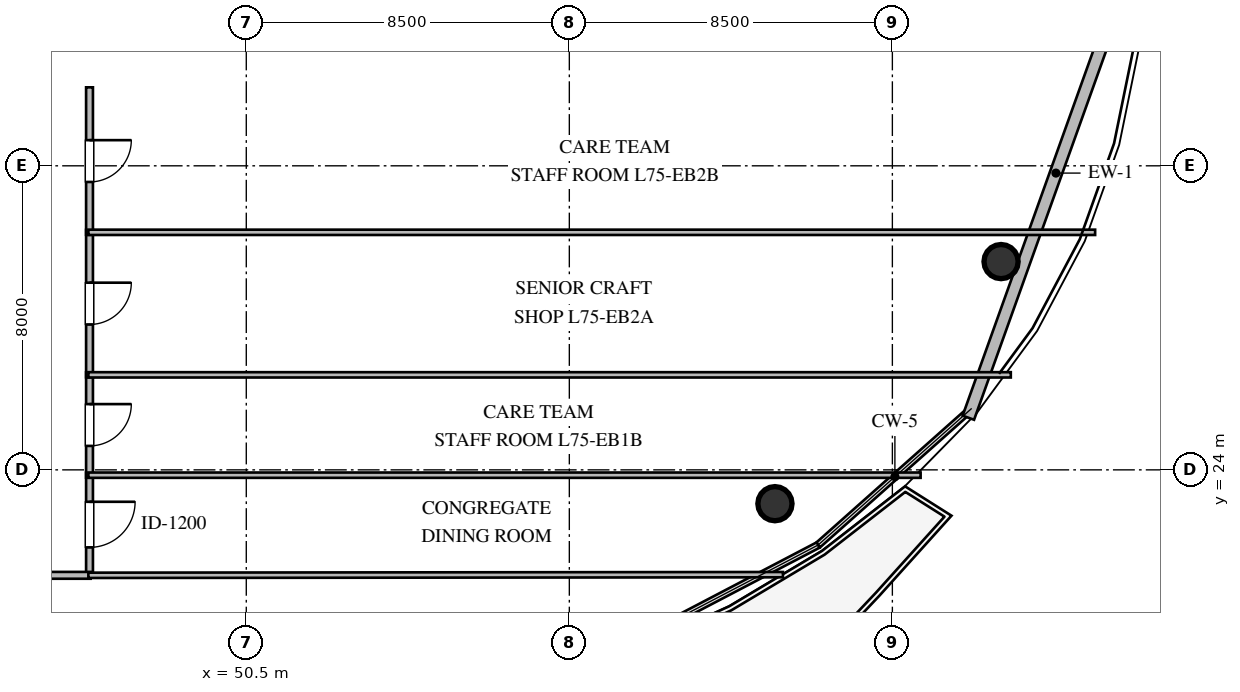
"""IFC4 building model, lengths in metres.
Left out: names, types, materials, properties, quantities, classifications, styles, units other than length and angle.
Written with IfcOpenShell. Run it as: python <this file> out.ifc"""

import sys

from ifc_helpers import new_model, si_unit, direction, frame, frame_2d, origin, origin_2d, place, context, subcontext, project, spatial, rectangle, circle, extrude, element, fill, save


model = new_model("IFC4")
c1 = context("Model", 3, precision=1e-05, world=origin(), true_north=direction((0.0, 1.0)))
c2 = subcontext(c1, "Body", "Model", "MODEL_VIEW")
j1 = project(units=[si_unit("LENGTHUNIT", "METRE"), si_unit("PLANEANGLEUNIT", "RADIAN")], contexts=[c1])
p1 = place(None, origin())
s1 = spatial("IfcSite", under=j1, at=p1, CompositionType="ELEMENT")
p2 = place(p1, origin())
s2 = spatial("IfcBuilding", under=s1, at=p2, CompositionType="ELEMENT")
p3 = place(p2, frame((0.0, 0.0, 285.2)))
s3 = spatial("IfcBuildingStorey", under=s2, at=p3, CompositionType="ELEMENT", Elevation=285.2)
for number, where, z_axis, x_axis in (
    (1, (64.41, 23.11, 0.0), (0.0, 0.0, 1.0), (1.0, 0.0, 0.0)),
    (2, (70.36, 29.48, 0.0), (0.0, 0.0, 1.0), (1.0, 0.0, 0.0)),
):
    element("IfcColumn", number, at=place(p3, frame(where, z_axis=z_axis, x_axis=x_axis)), inside=s3, PredefinedType="COLUMN", context=c2, shape_type="SweptSolid", body=[
        extrude(circle(Radius=0.45, at=origin_2d()), origin(), (0.0, 0.0, 1.0), 3.8),
    ])
p4 = place(p3, frame((74.108, 38.245, 0.0), z_axis=(0.0, 0.0, 1.0), x_axis=(-0.337073777429, -0.941478235845, 0.0)))
e3 = element("IfcWall", 3, at=p4, inside=s3, PredefinedType="STANDARD", context=c2, shape_type="SweptSolid", body=[
    extrude(rectangle(XDim=13.673, YDim=0.32, at=frame_2d((6.837, 0.0))), origin(), (0.0, 0.0, 1.0), 3.56),
])
p5 = place(p3, frame((46.375, 23.925, 0.0), z_axis=(0.0, 0.0, 1.0), x_axis=(0.0, -1.0, 0.0)))
e4 = element("IfcWall", 4, at=p5, inside=s3, PredefinedType="PARTITIONING", context=c2, shape_type="SweptSolid", body=[
    extrude(rectangle(XDim=2.73, YDim=0.18, at=frame_2d((1.365, 0.0))), origin(), (0.0, 0.0, 1.0), 3.56),
])
p6 = place(p5, frame((0.765, 0.0, 0.0)))
e5 = element("IfcOpeningElement", 5, at=p6, cuts=e4, PredefinedType="OPENING", context=c2, shape_type="SweptSolid", body=[
    extrude(rectangle(XDim=1.2, YDim=2.15, at=frame_2d((0.6, 1.075))), frame((0.0, 0.1, 0.0), z_axis=(0.0, -1.0, 0.0), x_axis=(1.0, 0.0, 0.0)), (0.0, 0.0, 1.0), 0.2),
])
p7 = place(p3, frame((46.375, 26.565, 0.0), z_axis=(0.0, 0.0, 1.0), x_axis=(0.0, -1.0, 0.0)))
e6 = element("IfcWall", 6, at=p7, inside=s3, PredefinedType="PARTITIONING", context=c2, shape_type="SweptSolid", body=[
    extrude(rectangle(XDim=2.77, YDim=0.18, at=frame_2d((1.385, 0.0))), origin(), (0.0, 0.0, 1.0), 3.56),
])
p8 = place(p7, frame((0.835, 0.0, 0.0)))
e7 = element("IfcOpeningElement", 7, at=p8, cuts=e6, PredefinedType="OPENING", context=c2, shape_type="SweptSolid", body=[
    extrude(rectangle(XDim=1.1, YDim=2.1, at=frame_2d((0.55, 1.05))), frame((0.0, 0.1, 0.0), z_axis=(0.0, -1.0, 0.0), x_axis=(1.0, 0.0, 0.0)), (0.0, 0.0, 1.0), 0.2),
])
p9 = place(p3, frame((46.375, 30.315, 0.0), z_axis=(0.0, 0.0, 1.0), x_axis=(0.0, -1.0, 0.0)))
e8 = element("IfcWall", 8, at=p9, inside=s3, PredefinedType="PARTITIONING", context=c2, shape_type="SweptSolid", body=[
    extrude(rectangle(XDim=3.88, YDim=0.18, at=frame_2d((1.94, 0.0))), origin(), (0.0, 0.0, 1.0), 3.56),
])
p10 = place(p9, frame((1.39, 0.0, 0.0)))
e9 = element("IfcOpeningElement", 9, at=p10, cuts=e8, PredefinedType="OPENING", context=c2, shape_type="SweptSolid", body=[
    extrude(rectangle(XDim=1.1, YDim=2.1, at=frame_2d((0.55, 1.05))), frame((0.0, 0.1, 0.0), z_axis=(0.0, -1.0, 0.0), x_axis=(1.0, 0.0, 0.0)), (0.0, 0.0, 1.0), 0.2),
])
p11 = place(p3, frame((46.375, 34.065, 0.0), z_axis=(0.0, 0.0, 1.0), x_axis=(0.0, -1.0, 0.0)))
e10 = element("IfcWall", 10, at=p11, inside=s3, PredefinedType="PARTITIONING", context=c2, shape_type="SweptSolid", body=[
    extrude(rectangle(XDim=3.88, YDim=0.18, at=frame_2d((1.94, 0.0))), origin(), (0.0, 0.0, 1.0), 3.56),
])
p12 = place(p11, frame((1.39, 0.0, 0.0)))
e11 = element("IfcOpeningElement", 11, at=p12, cuts=e10, PredefinedType="OPENING", context=c2, shape_type="SweptSolid", body=[
    extrude(rectangle(XDim=1.1, YDim=2.1, at=frame_2d((0.55, 1.05))), frame((0.0, 0.1, 0.0), z_axis=(0.0, -1.0, 0.0), x_axis=(1.0, 0.0, 0.0)), (0.0, 0.0, 1.0), 0.2),
])
p13 = place(p3, frame((46.405, 21.225, 0.0), z_axis=(0.0, 0.0, 1.0), x_axis=(-1.0, 0.0, 0.0)))
e12 = element("IfcWall", 12, at=p13, inside=s3, PredefinedType="PARTITIONING", context=c2, shape_type="SweptSolid", body=[
    extrude(rectangle(XDim=13.47, YDim=0.18, at=frame_2d((6.735, 0.0))), origin(), (0.0, 0.0, 1.0), 3.196),
])
p14 = place(p13, frame((6.135, 0.0, 0.0)))
e13 = element("IfcOpeningElement", 13, at=p14, cuts=e12, PredefinedType="OPENING", context=c2, shape_type="SweptSolid", body=[
    extrude(rectangle(XDim=1.2, YDim=2.15, at=frame_2d((0.6, 1.075))), frame((0.0, 0.1, 0.0), z_axis=(0.0, -1.0, 0.0), x_axis=(1.0, 0.0, 0.0)), (0.0, 0.0, 1.0), 0.2),
])
p15 = place(p3, frame((46.345, 23.86, 0.0), z_axis=(0.0, 0.0, 1.0), x_axis=(1.0, 0.0, 0.0)))
e14 = element("IfcWall", 14, at=p15, inside=s3, PredefinedType="PARTITIONING", context=c2, shape_type="SweptSolid", body=[
    extrude(rectangle(XDim=21.898, YDim=0.14, at=frame_2d((10.949, 0.0))), origin(), (0.0, 0.0, 1.0), 3.09),
])
p16 = place(p3, frame((64.621, 21.243, 0.0), z_axis=(0.0, 0.0, 1.0), x_axis=(-0.999999524525, -0.000975166183, 0.0)))
e15 = element("IfcWall", 15, at=p16, inside=s3, PredefinedType="PARTITIONING", context=c2, shape_type="SweptSolid", body=[
    extrude(rectangle(XDim=18.276, YDim=0.14, at=frame_2d((9.138, 0.0))), origin(), (0.0, 0.0, 1.0), 3.196),
])
p17 = place(p3, frame((46.345, 26.5, 0.0), z_axis=(0.0, 0.0, 1.0), x_axis=(1.0, 0.0, 0.0)))
e16 = element("IfcWall", 16, at=p17, inside=s3, PredefinedType="PARTITIONING", context=c2, shape_type="SweptSolid", body=[
    extrude(rectangle(XDim=24.271, YDim=0.14, at=frame_2d((12.135, 0.0))), origin(), (0.0, 0.0, 1.0), 3.09),
])
p18 = place(p3, frame((46.345, 30.25, 0.0), z_axis=(0.0, 0.0, 1.0), x_axis=(1.0, 0.0, 0.0)))
e17 = element("IfcWall", 17, at=p18, inside=s3, PredefinedType="PARTITIONING", context=c2, shape_type="SweptSolid", body=[
    extrude(rectangle(XDim=26.49, YDim=0.14, at=frame_2d((13.245, 0.0))), origin(), (0.0, 0.0, 1.0), 3.56),
])
p19 = place(p6, origin())
e18 = element("IfcDoor", 18, at=p19, inside=s3, OperationType="SINGLE_SWING_LEFT", PredefinedType="DOOR", context=c2, shape_type="SweptSolid", body=[
    extrude(rectangle(XDim=1.2, YDim=2.15, at=frame_2d((0.6, 1.075))), frame((0.0, 0.025, 0.0), z_axis=(0.0, -1.0, 0.0), x_axis=(1.0, 0.0, 0.0)), (0.0, 0.0, 1.0), 0.05),
])
fill(e5, e18)
p20 = place(p8, origin())
e19 = element("IfcDoor", 19, at=p20, inside=s3, OperationType="SINGLE_SWING_LEFT", PredefinedType="DOOR", context=c2, shape_type="SweptSolid", body=[
    extrude(rectangle(XDim=1.1, YDim=2.1, at=frame_2d((0.55, 1.05))), frame((0.0, 0.025, 0.0), z_axis=(0.0, -1.0, 0.0), x_axis=(1.0, 0.0, 0.0)), (0.0, 0.0, 1.0), 0.05),
])
fill(e7, e19)
p21 = place(p10, origin())
e20 = element("IfcDoor", 20, at=p21, inside=s3, OperationType="SINGLE_SWING_LEFT", PredefinedType="DOOR", context=c2, shape_type="SweptSolid", body=[
    extrude(rectangle(XDim=1.1, YDim=2.1, at=frame_2d((0.55, 1.05))), frame((0.0, 0.025, 0.0), z_axis=(0.0, -1.0, 0.0), x_axis=(1.0, 0.0, 0.0)), (0.0, 0.0, 1.0), 0.05),
])
fill(e9, e20)
p22 = place(p12, origin())
e21 = element("IfcDoor", 21, at=p22, inside=s3, OperationType="SINGLE_SWING_LEFT", PredefinedType="DOOR", context=c2, shape_type="SweptSolid", body=[
    extrude(rectangle(XDim=1.1, YDim=2.1, at=frame_2d((0.55, 1.05))), frame((0.0, 0.025, 0.0), z_axis=(0.0, -1.0, 0.0), x_axis=(1.0, 0.0, 0.0)), (0.0, 0.0, 1.0), 0.05),
])
fill(e11, e21)
save(model, sys.argv[1])
